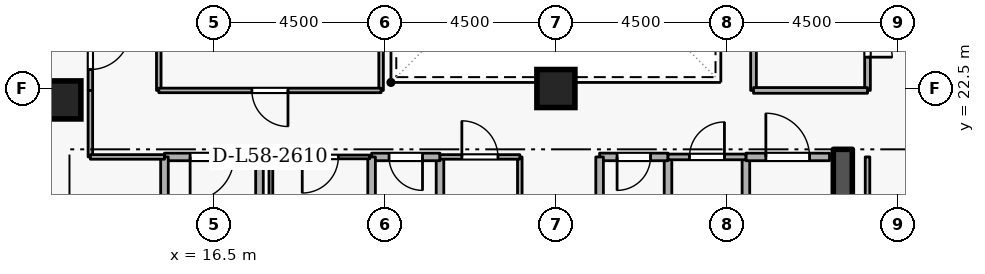
"""IFC4 building model, lengths in metres.
Left out: names, types, materials, properties, quantities, classifications, styles, units other than length and angle.
Written with IfcOpenShell. Run it as: python <this file> out.ifc"""

import sys

from ifc_helpers import new_model, si_unit, direction, frame, frame_2d, origin, origin_2d, place, context, subcontext, project, spatial, rectangle, extrude, element, fill, save


model = new_model("IFC4")
c1 = context("Model", 3, precision=1e-05, world=origin(), true_north=direction((0.0, 1.0)))
c2 = subcontext(c1, "Body", "Model", "MODEL_VIEW")
j1 = project(units=[si_unit("LENGTHUNIT", "METRE"), si_unit("PLANEANGLEUNIT", "RADIAN")], contexts=[c1])
p1 = place(None, origin())
s1 = spatial("IfcSite", under=j1, at=p1, CompositionType="ELEMENT")
p2 = place(p1, origin())
s2 = spatial("IfcBuilding", under=s1, at=p2, CompositionType="ELEMENT")
p3 = place(p2, frame((0.0, 0.0, 218.1)))
s3 = spatial("IfcBuildingStorey", under=s2, at=p3, CompositionType="ELEMENT", Elevation=218.1)
p4 = place(p3, frame((33.05, 15.1, 0.0), z_axis=(0.0, 0.0, 1.0), x_axis=(0.0, 1.0, 0.0)))
e1 = element("IfcWall", 1, at=p4, inside=s3, PredefinedType="SHEAR", context=c2, shape_type="SweptSolid", body=[
    extrude(rectangle(XDim=5.8, YDim=0.5, at=frame_2d((2.9, 0.0))), origin(), (0.0, 0.0, 1.0), 3.6),
])
for number, where, z_axis, x_axis in (
    (2, (12.5, 22.2, 0.0), (0.0, 0.0, 1.0), (1.0, 0.0, 0.0)),
    (3, (25.5, 22.5, 0.0), (0.0, 0.0, 1.0), (1.0, 0.0, 0.0)),
):
    element("IfcColumn", number, at=place(p3, frame(where, z_axis=z_axis, x_axis=x_axis)), inside=s3, PredefinedType="COLUMN", context=c2, shape_type="SweptSolid", body=[
        extrude(rectangle(XDim=1.0, YDim=1.0, at=origin_2d()), origin(), (0.0, 0.0, 1.0), 3.6),
    ])
p5 = place(p3, frame((17.7, 18.4, 0.0), z_axis=(0.0, 0.0, 1.0), x_axis=(0.0, 1.0, 0.0)))
e4 = element("IfcWall", 4, at=p5, inside=s3, PredefinedType="STANDARD", context=c2, shape_type="SweptSolid", body=[
    extrude(rectangle(XDim=2.3, YDim=0.2, at=frame_2d((1.15, 0.0))), origin(), (0.0, 0.0, 1.0), 2.465),
])
p6 = place(p3, frame((17.7, 20.7, 0.0), z_axis=(0.0, 0.0, 1.0), x_axis=(-1.0, 0.0, 0.0)))
e5 = element("IfcWall", 5, at=p6, inside=s3, PredefinedType="STANDARD", context=c2, shape_type="SweptSolid", body=[
    extrude(rectangle(XDim=2.5, YDim=0.2, at=frame_2d((1.25, 0.0))), origin(), (0.0, 0.0, 1.0), 3.26),
])
p7 = place(p6, frame((0.675, 0.0, 0.0)))
e6 = element("IfcOpeningElement", 6, at=p7, cuts=e5, PredefinedType="OPENING", context=c2, shape_type="SweptSolid", body=[
    extrude(rectangle(XDim=1.15, YDim=2.1, at=frame_2d((0.575, 1.05))), frame((0.0, 0.11, 0.0), z_axis=(0.0, -1.0, 0.0), x_axis=(1.0, 0.0, 0.0)), (0.0, 0.0, 1.0), 0.22),
])
p8 = place(p3, frame((15.2, 20.7, 0.0), z_axis=(0.0, 0.0, 1.0), x_axis=(0.0, -1.0, 0.0)))
e7 = element("IfcWall", 7, at=p8, inside=s3, PredefinedType="STANDARD", context=c2, shape_type="SweptSolid", body=[
    extrude(rectangle(XDim=5.7, YDim=0.2, at=frame_2d((2.85, 0.0))), origin(), (0.0, 0.0, 1.0), 3.26),
])
p9 = place(p3, frame((28.45, 18.65, 0.0), z_axis=(0.0, 0.0, 1.0), x_axis=(0.0, 1.0, 0.0)))
e8 = element("IfcWall", 8, at=p9, inside=s3, PredefinedType="STANDARD", context=c2, shape_type="SweptSolid", body=[
    extrude(rectangle(XDim=2.05, YDim=0.2, at=frame_2d((1.025, 0.0))), origin(), (0.0, 0.0, 1.0), 3.26),
])
p10 = place(p3, frame((28.45, 20.7, 0.0), z_axis=(0.0, 0.0, 1.0), x_axis=(-1.0, 0.0, 0.0)))
e9 = element("IfcWall", 9, at=p10, inside=s3, PredefinedType="STANDARD", context=c2, shape_type="SweptSolid", body=[
    extrude(rectangle(XDim=1.8, YDim=0.2, at=frame_2d((0.9, 0.0))), origin(), (0.0, 0.0, 1.0), 3.26),
])
p11 = place(p10, frame((0.46, 0.0, 0.0)))
e10 = element("IfcOpeningElement", 10, at=p11, cuts=e9, PredefinedType="OPENING", context=c2, shape_type="SweptSolid", body=[
    extrude(rectangle(XDim=0.88, YDim=2.04, at=frame_2d((0.44, 1.02))), frame((0.0, 0.11, 0.0), z_axis=(0.0, -1.0, 0.0), x_axis=(1.0, 0.0, 0.0)), (0.0, 0.0, 1.0), 0.22),
])
for number, where, z_axis, x_axis in (
    (11, (26.65, 20.7, 0.0), (0.0, 0.0, 1.0), (0.0, -1.0, 0.0)),
    (12, (22.45, 18.65, 0.0), (0.0, 0.0, 1.0), (0.0, 1.0, 0.0)),
):
    element("IfcWall", number, at=place(p3, frame(where, z_axis=z_axis, x_axis=x_axis)), inside=s3, PredefinedType="STANDARD", context=c2, shape_type="SweptSolid", body=[
        extrude(rectangle(XDim=2.05, YDim=0.2, at=frame_2d((1.025, 0.0))), origin(), (0.0, 0.0, 1.0), 3.26),
    ])
p12 = place(p3, frame((22.45, 20.7, 0.0), z_axis=(0.0, 0.0, 1.0), x_axis=(-1.0, 0.0, 0.0)))
e13 = element("IfcWall", 13, at=p12, inside=s3, PredefinedType="STANDARD", context=c2, shape_type="SweptSolid", body=[
    extrude(rectangle(XDim=1.8, YDim=0.2, at=frame_2d((0.9, 0.0))), origin(), (0.0, 0.0, 1.0), 3.26),
])
p13 = place(p12, frame((0.46, 0.0, 0.0)))
e14 = element("IfcOpeningElement", 14, at=p13, cuts=e13, PredefinedType="OPENING", context=c2, shape_type="SweptSolid", body=[
    extrude(rectangle(XDim=0.88, YDim=2.04, at=frame_2d((0.44, 1.02))), frame((0.0, 0.11, 0.0), z_axis=(0.0, -1.0, 0.0), x_axis=(1.0, 0.0, 0.0)), (0.0, 0.0, 1.0), 0.22),
])
for number, where, z_axis, x_axis in (
    (15, (20.65, 20.7, 0.0), (0.0, 0.0, 1.0), (0.0, -1.0, 0.0)),
    (16, (30.5, 18.65, 0.0), (0.0, 0.0, 1.0), (0.0, 1.0, 0.0)),
):
    element("IfcWall", number, at=place(p3, frame(where, z_axis=z_axis, x_axis=x_axis)), inside=s3, PredefinedType="STANDARD", context=c2, shape_type="SweptSolid", body=[
        extrude(rectangle(XDim=2.05, YDim=0.2, at=frame_2d((1.025, 0.0))), origin(), (0.0, 0.0, 1.0), 3.26),
    ])
p14 = place(p3, frame((30.5, 20.7, 0.0), z_axis=(0.0, 0.0, 1.0), x_axis=(1.0, 0.0, 0.0)))
e17 = element("IfcWall", 17, at=p14, inside=s3, PredefinedType="STANDARD", context=c2, shape_type="SweptSolid", body=[
    extrude(rectangle(XDim=2.2, YDim=0.2, at=frame_2d((1.1, 0.0))), origin(), (0.0, 0.0, 1.0), 3.26),
])
p15 = place(p14, frame((0.525, 0.0, 0.0)))
e18 = element("IfcOpeningElement", 18, at=p15, cuts=e17, PredefinedType="OPENING", context=c2, shape_type="SweptSolid", body=[
    extrude(rectangle(XDim=1.15, YDim=2.1, at=frame_2d((0.575, 1.05))), frame((0.0, 0.11, 0.0), z_axis=(0.0, -1.0, 0.0), x_axis=(1.0, 0.0, 0.0)), (0.0, 0.0, 1.0), 0.22),
])
p16 = place(p3, frame((20.6, 20.7, 0.0), z_axis=(0.0, 0.0, 1.0), x_axis=(-1.0, 0.0, 0.0)))
e19 = element("IfcWall", 19, at=p16, inside=s3, PredefinedType="PARTITIONING", context=c2, shape_type="SweptSolid", body=[
    extrude(rectangle(XDim=2.6, YDim=0.1, at=frame_2d((1.3, 0.0))), origin(), (0.0, 0.0, 1.0), 3.26),
])
p17 = place(p16, frame((0.825, 0.0, 0.0)))
e20 = element("IfcOpeningElement", 20, at=p17, cuts=e19, PredefinedType="OPENING", context=c2, shape_type="SweptSolid", body=[
    extrude(rectangle(XDim=0.95, YDim=2.1, at=frame_2d((0.475, 1.05))), frame((0.0, 0.06, 0.0), z_axis=(0.0, -1.0, 0.0), x_axis=(1.0, 0.0, 0.0)), (0.0, 0.0, 1.0), 0.12),
])
p18 = place(p3, frame((18.0, 20.7, 0.0), z_axis=(0.0, 0.0, 1.0), x_axis=(0.0, -1.0, 0.0)))
e21 = element("IfcWall", 21, at=p18, inside=s3, PredefinedType="PARTITIONING", context=c2, shape_type="SweptSolid", body=[
    extrude(rectangle(XDim=2.05, YDim=0.1, at=frame_2d((1.025, 0.0))), origin(), (0.0, 0.0, 1.0), 2.465),
])
p19 = place(p3, frame((24.55, 20.7, 0.0), z_axis=(0.0, 0.0, 1.0), x_axis=(0.0, -1.0, 0.0)))
e22 = element("IfcWall", 22, at=p19, inside=s3, PredefinedType="PARTITIONING", context=c2, shape_type="SweptSolid", body=[
    extrude(rectangle(XDim=2.05, YDim=0.12, at=frame_2d((1.025, 0.0))), origin(), (0.0, 0.0, 1.0), 3.26),
])
p20 = place(p3, frame((22.45, 20.7, 0.0), z_axis=(0.0, 0.0, 1.0), x_axis=(1.0, 0.0, 0.0)))
e23 = element("IfcWall", 23, at=p20, inside=s3, PredefinedType="PARTITIONING", context=c2, shape_type="SweptSolid", body=[
    extrude(rectangle(XDim=2.1, YDim=0.12, at=frame_2d((1.05, 0.0))), origin(), (0.0, 0.0, 1.0), 3.26),
])
p21 = place(p20, frame((0.575, 0.0, 0.0)))
e24 = element("IfcOpeningElement", 24, at=p21, cuts=e23, PredefinedType="OPENING", context=c2, shape_type="SweptSolid", body=[
    extrude(rectangle(XDim=0.95, YDim=2.1, at=frame_2d((0.475, 1.05))), frame((0.0, 0.07, 0.0), z_axis=(0.0, -1.0, 0.0), x_axis=(1.0, 0.0, 0.0)), (0.0, 0.0, 1.0), 0.14),
])
p22 = place(p3, frame((28.45, 20.7, 0.0), z_axis=(0.0, 0.0, 1.0), x_axis=(1.0, 0.0, 0.0)))
e25 = element("IfcWall", 25, at=p22, inside=s3, PredefinedType="PARTITIONING", context=c2, shape_type="SweptSolid", body=[
    extrude(rectangle(XDim=2.05, YDim=0.15, at=frame_2d((1.025, 0.0))), origin(), (0.0, 0.0, 1.0), 3.26),
])
p23 = place(p22, frame((0.565, 0.0, 0.0)))
e26 = element("IfcOpeningElement", 26, at=p23, cuts=e25, PredefinedType="OPENING", context=c2, shape_type="SweptSolid", body=[
    extrude(rectangle(XDim=0.92, YDim=2.08, at=frame_2d((0.46, 1.04))), frame((0.0, 0.085, 0.0), z_axis=(0.0, -1.0, 0.0), x_axis=(1.0, 0.0, 0.0)), (0.0, 0.0, 1.0), 0.17),
])
p24 = place(p3, frame((33.7, 20.7, 0.0), z_axis=(0.0, 0.0, 1.0), x_axis=(0.0, -1.0, 0.0)))
e27 = element("IfcWall", 27, at=p24, inside=s3, PredefinedType="PARTITIONING", context=c2, shape_type="SweptSolid", body=[
    extrude(rectangle(XDim=5.9, YDim=0.12, at=frame_2d((2.95, 0.0))), origin(), (0.0, 0.0, 1.0), 3.26),
])
p25 = place(p3, frame((13.25, 24.6, 0.0), z_axis=(0.0, 0.0, 1.0), x_axis=(0.0, -1.0, 0.0)))
e28 = element("IfcWall", 28, at=p25, inside=s3, PredefinedType="PARTITIONING", context=c2, shape_type="SweptSolid", body=[
    extrude(rectangle(XDim=2.15, YDim=0.12, at=frame_2d((1.075, 0.0))), origin(), (0.0, 0.0, 1.0), 3.26),
])
p26 = place(p25, frame((0.55, 0.0, 0.0)))
e29 = element("IfcOpeningElement", 29, at=p26, cuts=e28, PredefinedType="OPENING", context=c2, shape_type="SweptSolid", body=[
    extrude(rectangle(XDim=1.05, YDim=2.1, at=frame_2d((0.525, 1.05))), frame((0.0, 0.07, 0.0), z_axis=(0.0, -1.0, 0.0), x_axis=(1.0, 0.0, 0.0)), (0.0, 0.0, 1.0), 0.14),
])
p27 = place(p3, frame((13.25, 22.45, 0.0), z_axis=(0.0, 0.0, 1.0), x_axis=(0.0, -1.0, 0.0)))
e30 = element("IfcWall", 30, at=p27, inside=s3, PredefinedType="PARTITIONING", context=c2, shape_type="SweptSolid", body=[
    extrude(rectangle(XDim=1.75, YDim=0.12, at=frame_2d((0.875, 0.0))), origin(), (0.0, 0.0, 1.0), 3.26),
])
p28 = place(p3, frame((13.25, 20.7, 0.0), z_axis=(0.0, 0.0, 1.0), x_axis=(1.0, 0.0, 0.0)))
e31 = element("IfcWall", 31, at=p28, inside=s3, PredefinedType="PARTITIONING", context=c2, shape_type="SweptSolid", body=[
    extrude(rectangle(XDim=1.95, YDim=0.12, at=frame_2d((0.975, 0.0))), origin(), (0.0, 0.0, 1.0), 3.26),
])
for number, where, z_axis, x_axis in (
    (32, (15.05, 22.45, 0.0), (0.0, 0.0, 1.0), (0.0, 1.0, 0.0)),
    (33, (20.9, 26.2, 0.0), (0.0, 0.0, 1.0), (0.0, -1.0, 0.0)),
):
    element("IfcWall", number, at=place(p3, frame(where, z_axis=z_axis, x_axis=x_axis)), inside=s3, PredefinedType="PARTITIONING", context=c2, shape_type="SweptSolid", body=[
        extrude(rectangle(XDim=3.75, YDim=0.12, at=frame_2d((1.875, 0.0))), origin(), (0.0, 0.0, 1.0), 3.26),
    ])
p29 = place(p3, frame((20.9, 22.45, 0.0), z_axis=(0.0, 0.0, 1.0), x_axis=(-1.0, 0.0, 0.0)))
e34 = element("IfcWall", 34, at=p29, inside=s3, PredefinedType="PARTITIONING", context=c2, shape_type="SweptSolid", body=[
    extrude(rectangle(XDim=5.85, YDim=0.12, at=frame_2d((2.925, 0.0))), origin(), (0.0, 0.0, 1.0), 3.26),
])
p30 = place(p29, frame((2.45, 0.0, 0.0)))
e35 = element("IfcOpeningElement", 35, at=p30, cuts=e34, PredefinedType="OPENING", context=c2, shape_type="SweptSolid", body=[
    extrude(rectangle(XDim=0.95, YDim=2.1, at=frame_2d((0.475, 1.05))), frame((0.0, 0.07, 0.0), z_axis=(0.0, -1.0, 0.0), x_axis=(1.0, 0.0, 0.0)), (0.0, 0.0, 1.0), 0.14),
])
p31 = place(p3, frame((30.7, 22.45, 0.0), z_axis=(0.0, 0.0, 1.0), x_axis=(0.0, 1.0, 0.0)))
e36 = element("IfcWall", 36, at=p31, inside=s3, PredefinedType="PARTITIONING", context=c2, shape_type="SweptSolid", body=[
    extrude(rectangle(XDim=3.05, YDim=0.15, at=frame_2d((1.525, 0.0))), origin(), (0.0, 0.0, 1.0), 3.26),
])
p32 = place(p3, frame((33.7, 25.5, 0.0), z_axis=(0.0, 0.0, 1.0), x_axis=(0.0, -1.0, 0.0)))
e37 = element("IfcWall", 37, at=p32, inside=s3, PredefinedType="PARTITIONING", context=c2, shape_type="SweptSolid", body=[
    extrude(rectangle(XDim=3.05, YDim=0.15, at=frame_2d((1.525, 0.0))), origin(), (0.0, 0.0, 1.0), 3.26),
])
p33 = place(p32, frame((0.875, 0.0, 0.0)))
e38 = element("IfcOpeningElement", 38, at=p33, cuts=e37, PredefinedType="OPENING", context=c2, shape_type="SweptSolid", body=[
    extrude(rectangle(XDim=1.3, YDim=2.12, at=frame_2d((0.65, 1.06))), frame((0.0, 0.085, 0.0), z_axis=(0.0, -1.0, 0.0), x_axis=(1.0, 0.0, 0.0)), (0.0, 0.0, 1.0), 0.17),
])
p34 = place(p3, frame((33.7, 22.45, 0.0), z_axis=(0.0, 0.0, 1.0), x_axis=(-1.0, 0.0, 0.0)))
e39 = element("IfcWall", 39, at=p34, inside=s3, PredefinedType="PARTITIONING", context=c2, shape_type="SweptSolid", body=[
    extrude(rectangle(XDim=3.0, YDim=0.15, at=frame_2d((1.5, 0.0))), origin(), (0.0, 0.0, 1.0), 3.26),
])
p35 = place(p7, origin())
e40 = element("IfcDoor", 40, at=p35, inside=s3, OperationType="SINGLE_SWING_RIGHT", PredefinedType="DOOR", context=c2, shape_type="SweptSolid", body=[
    extrude(rectangle(XDim=1.15, YDim=2.1, at=frame_2d((0.575, 1.05))), frame((0.0, 0.025, 0.0), z_axis=(0.0, -1.0, 0.0), x_axis=(1.0, 0.0, 0.0)), (0.0, 0.0, 1.0), 0.05),
])
fill(e6, e40)
p36 = place(p11, origin())
e41 = element("IfcDoor", 41, at=p36, inside=s3, OperationType="SINGLE_SWING_RIGHT", PredefinedType="DOOR", context=c2, shape_type="SweptSolid", body=[
    extrude(rectangle(XDim=0.88, YDim=2.04, at=frame_2d((0.44, 1.02))), frame((0.0, 0.025, 0.0), z_axis=(0.0, -1.0, 0.0), x_axis=(1.0, 0.0, 0.0)), (0.0, 0.0, 1.0), 0.05),
])
fill(e10, e41)
p37 = place(p13, origin())
e42 = element("IfcDoor", 42, at=p37, inside=s3, OperationType="SINGLE_SWING_LEFT", PredefinedType="DOOR", context=c2, shape_type="SweptSolid", body=[
    extrude(rectangle(XDim=0.88, YDim=2.04, at=frame_2d((0.44, 1.02))), frame((0.0, 0.025, 0.0), z_axis=(0.0, -1.0, 0.0), x_axis=(1.0, 0.0, 0.0)), (0.0, 0.0, 1.0), 0.05),
])
fill(e14, e42)
p38 = place(p17, origin())
e43 = element("IfcDoor", 43, at=p38, inside=s3, OperationType="SINGLE_SWING_RIGHT", PredefinedType="DOOR", context=c2, shape_type="SweptSolid", body=[
    extrude(rectangle(XDim=0.95, YDim=2.1, at=frame_2d((0.475, 1.05))), frame((0.0, 0.025, 0.0), z_axis=(0.0, -1.0, 0.0), x_axis=(1.0, 0.0, 0.0)), (0.0, 0.0, 1.0), 0.05),
])
fill(e20, e43)
p39 = place(p21, origin())
e44 = element("IfcDoor", 44, at=p39, inside=s3, OperationType="SINGLE_SWING_LEFT", PredefinedType="DOOR", context=c2, shape_type="SweptSolid", body=[
    extrude(rectangle(XDim=0.95, YDim=2.1, at=frame_2d((0.475, 1.05))), frame((0.0, 0.025, 0.0), z_axis=(0.0, -1.0, 0.0), x_axis=(1.0, 0.0, 0.0)), (0.0, 0.0, 1.0), 0.05),
])
fill(e24, e44)
p40 = place(p23, origin())
e45 = element("IfcDoor", 45, at=p40, inside=s3, OperationType="SINGLE_SWING_RIGHT", PredefinedType="DOOR", context=c2, shape_type="SweptSolid", body=[
    extrude(rectangle(XDim=0.92, YDim=2.08, at=frame_2d((0.46, 1.04))), frame((0.0, 0.025, 0.0), z_axis=(0.0, -1.0, 0.0), x_axis=(1.0, 0.0, 0.0)), (0.0, 0.0, 1.0), 0.05),
])
fill(e26, e45)
p41 = place(p15, origin())
e46 = element("IfcDoor", 46, at=p41, inside=s3, OperationType="SINGLE_SWING_LEFT", PredefinedType="DOOR", context=c2, shape_type="SweptSolid", body=[
    extrude(rectangle(XDim=1.15, YDim=2.1, at=frame_2d((0.575, 1.05))), frame((0.0, 0.025, 0.0), z_axis=(0.0, -1.0, 0.0), x_axis=(1.0, 0.0, 0.0)), (0.0, 0.0, 1.0), 0.05),
])
fill(e18, e46)
p42 = place(p26, origin())
e47 = element("IfcDoor", 47, at=p42, inside=s3, OperationType="SINGLE_SWING_LEFT", PredefinedType="DOOR", context=c2, shape_type="SweptSolid", body=[
    extrude(rectangle(XDim=1.05, YDim=2.1, at=frame_2d((0.525, 1.05))), frame((0.0, 0.025, 0.0), z_axis=(0.0, -1.0, 0.0), x_axis=(1.0, 0.0, 0.0)), (0.0, 0.0, 1.0), 0.05),
])
fill(e29, e47)
p43 = place(p30, origin())
e48 = element("IfcDoor", 48, at=p43, inside=s3, OperationType="SINGLE_SWING_LEFT", PredefinedType="DOOR", context=c2, shape_type="SweptSolid", body=[
    extrude(rectangle(XDim=0.95, YDim=2.1, at=frame_2d((0.475, 1.05))), frame((0.0, 0.025, 0.0), z_axis=(0.0, -1.0, 0.0), x_axis=(1.0, 0.0, 0.0)), (0.0, 0.0, 1.0), 0.05),
])
fill(e35, e48)
p44 = place(p33, origin())
e49 = element("IfcDoor", 49, at=p44, inside=s3, OperationType="DOUBLE_DOOR_SINGLE_SWING", PredefinedType="DOOR", context=c2, shape_type="SweptSolid", body=[
    extrude(rectangle(XDim=1.3, YDim=2.12, at=frame_2d((0.65, 1.06))), frame((0.0, 0.025, 0.0), z_axis=(0.0, -1.0, 0.0), x_axis=(1.0, 0.0, 0.0)), (0.0, 0.0, 1.0), 0.05),
])
fill(e38, e49)
save(model, sys.argv[1])
